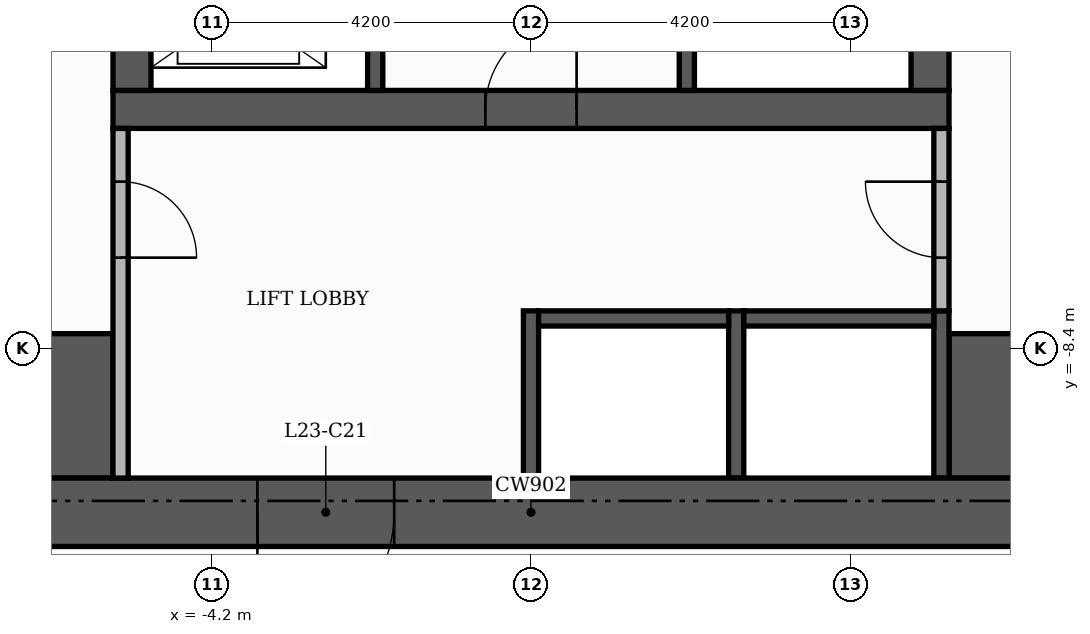
"""IFC4 building model, lengths in metres.
Left out: names, types, materials, properties, quantities, classifications, styles, units other than length and angle.
Written with IfcOpenShell. Run it as: python <this file> out.ifc"""

import sys

from ifc_helpers import new_model, si_unit, direction, frame, frame_2d, origin, place, context, subcontext, project, spatial, rectangle, extrude, element, fill, save


model = new_model("IFC4")
c1 = context("Model", 3, precision=1e-05, world=origin(), true_north=direction((0.0, 1.0)))
c2 = subcontext(c1, "Body", "Model", "MODEL_VIEW")
j1 = project(units=[si_unit("LENGTHUNIT", "METRE"), si_unit("PLANEANGLEUNIT", "RADIAN")], contexts=[c1])
p1 = place(None, origin())
s1 = spatial("IfcSite", under=j1, at=p1, CompositionType="ELEMENT")
p2 = place(p1, origin())
s2 = spatial("IfcBuilding", under=s1, at=p2, CompositionType="ELEMENT")
p3 = place(p2, frame((0.0, 0.0, 98.7)))
s3 = spatial("IfcBuildingStorey", under=s2, at=p3, CompositionType="ELEMENT", Elevation=98.7)
p4 = place(p3, frame((-5.5, -5.25, 0.0), z_axis=(0.0, 0.0, 1.0), x_axis=(1.0, 0.0, 0.0)))
e1 = element("IfcWall", 1, at=p4, inside=s3, PredefinedType="SHEAR", context=c2, shape_type="SweptSolid", body=[
    extrude(rectangle(XDim=11.0, YDim=0.5, at=frame_2d((5.5, 0.0))), origin(), (0.0, 0.0, 1.0), 3.48),
])
p5 = place(p4, frame((4.9, 0.0, 0.0)))
e2 = element("IfcOpeningElement", 2, at=p5, cuts=e1, PredefinedType="OPENING", context=c2, shape_type="SweptSolid", body=[
    extrude(rectangle(XDim=1.2, YDim=2.1, at=frame_2d((0.6, 1.05))), frame((0.0, 0.26, 0.0), z_axis=(0.0, -1.0, 0.0), x_axis=(1.0, 0.0, 0.0)), (0.0, 0.0, 1.0), 0.52),
])
for number, where, z_axis, x_axis in (
    (3, (-5.25, -5.0, 0.0), (0.0, 0.0, 1.0), (0.0, 1.0, 0.0)),
    (4, (5.25, -5.0, 0.0), (0.0, 0.0, 1.0), (0.0, 1.0, 0.0)),
):
    element("IfcWall", number, at=place(p3, frame(where, z_axis=z_axis, x_axis=x_axis)), inside=s3, PredefinedType="SHEAR", context=c2, shape_type="SweptSolid", body=[
        extrude(rectangle(XDim=10.5, YDim=0.5, at=frame_2d((5.25, 0.0))), origin(), (0.0, 0.0, 1.0), 3.48),
    ])
for number, where, z_axis, x_axis in (
    (5, (-10.1, -9.15, 0.0), (0.0, 0.0, 1.0), (1.0, 0.0, 0.0)),
    (6, (5.5, -9.15, 0.0), (0.0, 0.0, 1.0), (1.0, 0.0, 0.0)),
):
    element("IfcWall", number, at=place(p3, frame(where, z_axis=z_axis, x_axis=x_axis)), inside=s3, PredefinedType="SHEAR", context=c2, shape_type="SweptSolid", body=[
        extrude(rectangle(XDim=4.6, YDim=1.9, at=frame_2d((2.3, 0.0))), origin(), (0.0, 0.0, 1.0), 3.48),
    ])
p6 = place(p3, frame((2.05, -5.0, 0.0), z_axis=(0.0, 0.0, 1.0), x_axis=(0.0, 1.0, 0.0)))
e7 = element("IfcWall", 7, at=p6, inside=s3, PredefinedType="SHEAR", context=c2, shape_type="SweptSolid", body=[
    extrude(rectangle(XDim=6.6, YDim=0.2, at=frame_2d((3.3, 0.0))), origin(), (0.0, 0.0, 1.0), 3.48),
])
p7 = place(p6, frame((5.25, 0.0, 0.0)))
e8 = element("IfcOpeningElement", 8, at=p7, cuts=e7, PredefinedType="OPENING", context=c2, shape_type="SweptSolid", body=[
    extrude(rectangle(XDim=1.0, YDim=2.1, at=frame_2d((0.5, 1.05))), frame((0.0, 0.11, 0.0), z_axis=(0.0, -1.0, 0.0), x_axis=(1.0, 0.0, 0.0)), (0.0, 0.0, 1.0), 0.22),
])
for number, where, z_axis, x_axis in (
    (9, (0.0, -10.1, 0.0), (0.0, 0.0, 1.0), (0.0, 1.0, 0.0)),
    (10, (2.7, -10.1, 0.0), (0.0, 0.0, 1.0), (0.0, 1.0, 0.0)),
    (11, (5.4, -10.1, 0.0), (0.0, 0.0, 1.0), (0.0, 1.0, 0.0)),
):
    element("IfcWall", number, at=place(p3, frame(where, z_axis=z_axis, x_axis=x_axis)), inside=s3, PredefinedType="SHEAR", context=c2, shape_type="SweptSolid", body=[
        extrude(rectangle(XDim=2.2, YDim=0.2, at=frame_2d((1.1, 0.0))), origin(), (0.0, 0.0, 1.0), 3.48),
    ])
for number, where, z_axis, x_axis in (
    (12, (0.1, -8.0, 0.0), (0.0, 0.0, 1.0), (1.0, 0.0, 0.0)),
    (13, (2.8, -8.0, 0.0), (0.0, 0.0, 1.0), (1.0, 0.0, 0.0)),
):
    element("IfcWall", number, at=place(p3, frame(where, z_axis=z_axis, x_axis=x_axis)), inside=s3, PredefinedType="SHEAR", context=c2, shape_type="SweptSolid", body=[
        extrude(rectangle(XDim=2.5, YDim=0.2, at=frame_2d((1.25, 0.0))), origin(), (0.0, 0.0, 1.0), 3.48),
    ])
p8 = place(p3, frame((-2.05, -5.0, 0.0), z_axis=(0.0, 0.0, 1.0), x_axis=(0.0, 1.0, 0.0)))
e14 = element("IfcWall", 14, at=p8, inside=s3, PredefinedType="SHEAR", context=c2, shape_type="SweptSolid", body=[
    extrude(rectangle(XDim=3.4, YDim=0.2, at=frame_2d((1.7, 0.0))), origin(), (0.0, 0.0, 1.0), 3.48),
])
p9 = place(p8, frame((0.55, 0.0, 0.0)))
e15 = element("IfcOpeningElement", 15, at=p9, cuts=e14, PredefinedType="OPENING", context=c2, shape_type="SweptSolid", body=[
    extrude(rectangle(XDim=1.1, YDim=2.1, at=frame_2d((0.55, 1.05))), frame((0.0, 0.11, 0.0), z_axis=(0.0, -1.0, 0.0), x_axis=(1.0, 0.0, 0.0)), (0.0, 0.0, 1.0), 0.22),
])
p10 = place(p8, frame((2.45, 0.0, 0.0)))
e16 = element("IfcOpeningElement", 16, at=p10, cuts=e14, PredefinedType="OPENING", context=c2, shape_type="SweptSolid", body=[
    extrude(rectangle(XDim=0.8, YDim=2.1, at=frame_2d((0.4, 1.05))), frame((0.0, 0.11, 0.0), z_axis=(0.0, -1.0, 0.0), x_axis=(1.0, 0.0, 0.0)), (0.0, 0.0, 1.0), 0.22),
])
p11 = place(p3, frame((-11.0, -10.55, 0.0), z_axis=(0.0, 0.0, 1.0), x_axis=(1.0, 0.0, 0.0)))
e17 = element("IfcWall", 17, at=p11, inside=s3, PredefinedType="SHEAR", context=c2, shape_type="SweptSolid", body=[
    extrude(rectangle(XDim=22.0, YDim=0.9, at=frame_2d((11.0, 0.0))), origin(), (0.0, 0.0, 1.0), 3.48),
])
p12 = place(p11, frame((7.4, 0.0, 0.0)))
e18 = element("IfcOpeningElement", 18, at=p12, cuts=e17, PredefinedType="OPENING", context=c2, shape_type="SweptSolid", body=[
    extrude(rectangle(XDim=1.8, YDim=2.2, at=frame_2d((0.9, 1.1))), frame((0.0, 0.46, 0.0), z_axis=(0.0, -1.0, 0.0), x_axis=(1.0, 0.0, 0.0)), (0.0, 0.0, 1.0), 0.92),
])
p13 = place(p3, frame((-5.4, -10.1, 0.0), z_axis=(0.0, 0.0, 1.0), x_axis=(0.0, 1.0, 0.0)))
e19 = element("IfcWall", 19, at=p13, inside=s3, PredefinedType="PARTITIONING", context=c2, shape_type="SweptSolid", body=[
    extrude(rectangle(XDim=4.6, YDim=0.2, at=frame_2d((2.3, 0.0))), origin(), (0.0, 0.0, 1.0), 3.48),
])
p14 = place(p13, frame((2.9, 0.0, 0.0)))
e20 = element("IfcOpeningElement", 20, at=p14, cuts=e19, PredefinedType="OPENING", context=c2, shape_type="SweptSolid", body=[
    extrude(rectangle(XDim=1.0, YDim=2.1, at=frame_2d((0.5, 1.05))), frame((0.0, 0.11, 0.0), z_axis=(0.0, -1.0, 0.0), x_axis=(1.0, 0.0, 0.0)), (0.0, 0.0, 1.0), 0.22),
])
p15 = place(p3, frame((5.4, -7.9, 0.0), z_axis=(0.0, 0.0, 1.0), x_axis=(0.0, 1.0, 0.0)))
e21 = element("IfcWall", 21, at=p15, inside=s3, PredefinedType="PARTITIONING", context=c2, shape_type="SweptSolid", body=[
    extrude(rectangle(XDim=2.4, YDim=0.2, at=frame_2d((1.2, 0.0))), origin(), (0.0, 0.0, 1.0), 3.48),
])
p16 = place(p15, frame((0.7, 0.0, 0.0)))
e22 = element("IfcOpeningElement", 22, at=p16, cuts=e21, PredefinedType="OPENING", context=c2, shape_type="SweptSolid", body=[
    extrude(rectangle(XDim=1.0, YDim=2.1, at=frame_2d((0.5, 1.05))), frame((0.0, 0.11, 0.0), z_axis=(0.0, -1.0, 0.0), x_axis=(1.0, 0.0, 0.0)), (0.0, 0.0, 1.0), 0.22),
])
p17 = place(p5, origin())
e23 = element("IfcDoor", 23, at=p17, inside=s3, OperationType="SINGLE_SWING_RIGHT", PredefinedType="DOOR", context=c2, shape_type="SweptSolid", body=[
    extrude(rectangle(XDim=1.2, YDim=2.1, at=frame_2d((0.6, 1.05))), frame((0.0, 0.025, 0.0), z_axis=(0.0, -1.0, 0.0), x_axis=(1.0, 0.0, 0.0)), (0.0, 0.0, 1.0), 0.05),
])
fill(e2, e23)
p18 = place(p14, frame((1.0, 0.0, 0.0), z_axis=(0.0, 0.0, 1.0), x_axis=(-1.0, 0.0, 0.0)))
e24 = element("IfcDoor", 24, at=p18, inside=s3, OperationType="SINGLE_SWING_LEFT", PredefinedType="DOOR", context=c2, shape_type="SweptSolid", body=[
    extrude(rectangle(XDim=1.0, YDim=2.1, at=frame_2d((0.5, 1.05))), frame((0.0, 0.025, 0.0), z_axis=(0.0, -1.0, 0.0), x_axis=(1.0, 0.0, 0.0)), (0.0, 0.0, 1.0), 0.05),
])
fill(e20, e24)
p19 = place(p16, origin())
e25 = element("IfcDoor", 25, at=p19, inside=s3, OperationType="SINGLE_SWING_RIGHT", PredefinedType="DOOR", context=c2, shape_type="SweptSolid", body=[
    extrude(rectangle(XDim=1.0, YDim=2.1, at=frame_2d((0.5, 1.05))), frame((0.0, 0.025, 0.0), z_axis=(0.0, -1.0, 0.0), x_axis=(1.0, 0.0, 0.0)), (0.0, 0.0, 1.0), 0.05),
])
fill(e22, e25)
p20 = place(p12, frame((1.8, 0.0, 0.0), z_axis=(0.0, 0.0, 1.0), x_axis=(-1.0, 0.0, 0.0)))
e26 = element("IfcDoor", 26, at=p20, inside=s3, OperationType="DOUBLE_DOOR_SINGLE_SWING", PredefinedType="DOOR", context=c2, shape_type="SweptSolid", body=[
    extrude(rectangle(XDim=1.8, YDim=2.2, at=frame_2d((0.9, 1.1))), frame((0.0, 0.025, 0.0), z_axis=(0.0, -1.0, 0.0), x_axis=(1.0, 0.0, 0.0)), (0.0, 0.0, 1.0), 0.05),
])
fill(e18, e26)
save(model, sys.argv[1])
